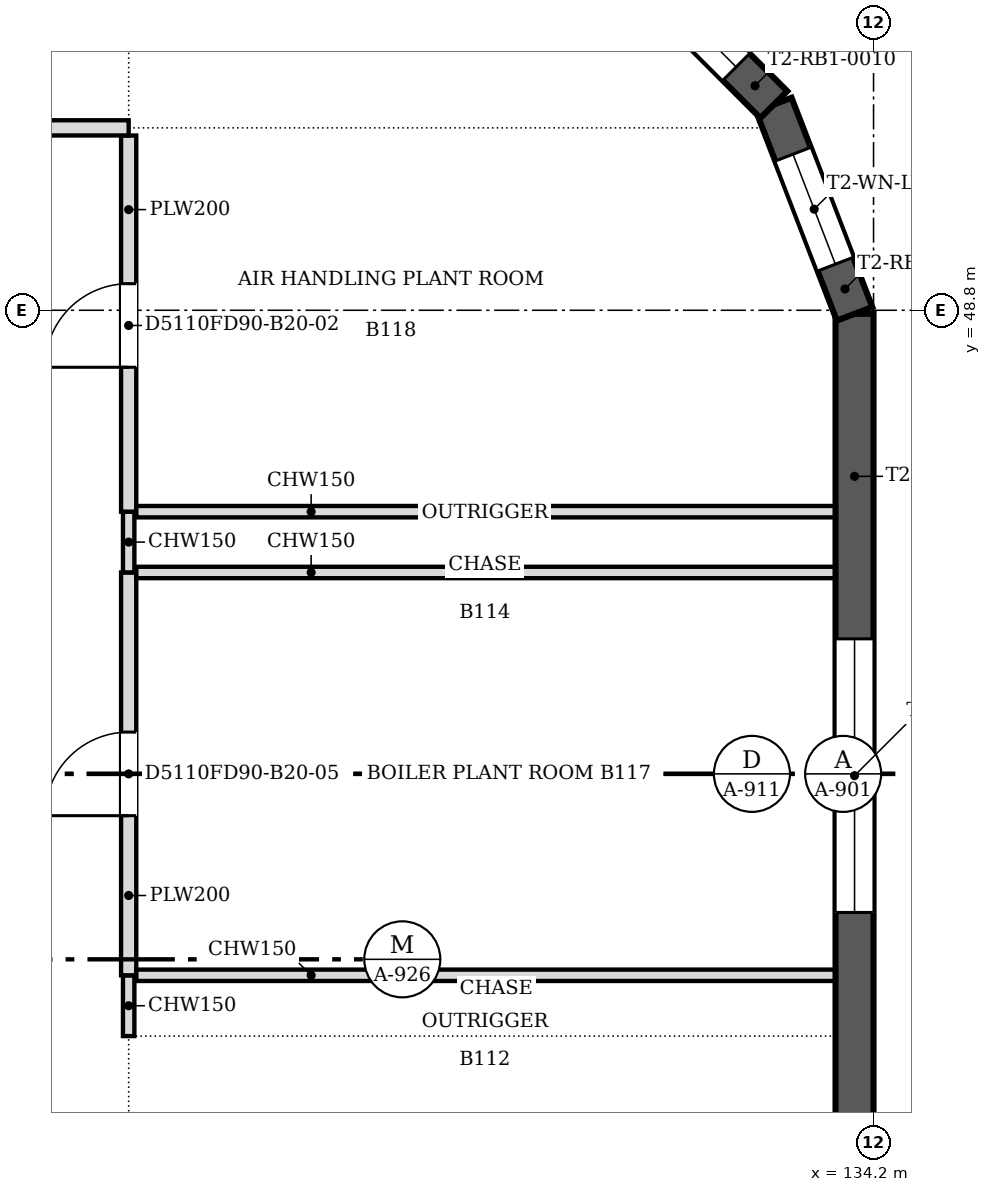
"""IFC4 building model, lengths in metres.
Left out: names, types, materials, properties, quantities, classifications, styles, units other than length and angle.
Written with IfcOpenShell. Run it as: python <this file> out.ifc"""

import sys

from ifc_helpers import new_model, si_unit, direction, frame, frame_2d, origin, place, context, subcontext, project, spatial, polyline, rectangle, outline, extrude, faceted_brep, source, transform, mapped, element, fill, save


model = new_model("IFC4")
c1 = context("Model", 3, precision=1e-05, world=origin(), true_north=direction((0.0, 1.0)))
c2 = subcontext(c1, "Body", "Model", "MODEL_VIEW")
j1 = project(units=[si_unit("LENGTHUNIT", "METRE"), si_unit("PLANEANGLEUNIT", "RADIAN")], contexts=[c1])
p1 = place(None, origin())
s1 = spatial("IfcSite", under=j1, at=p1, CompositionType="ELEMENT")
p2 = place(p1, origin())
s2 = spatial("IfcBuilding", under=s1, at=p2, CompositionType="ELEMENT")
p3 = place(p2, frame((0.0, 0.0, 63.8)))
s3 = spatial("IfcBuildingStorey", under=s2, at=p3, CompositionType="ELEMENT", Elevation=63.8)
m1 = source(origin(), c2, "Body", "Brep", [
    faceted_brep([(0.0, -0.25, 0.0), (12.154, -0.25, 0.0), (12.154, -0.25, 4.8), (0.0, -0.25, 4.8), (0.0, 0.25, 4.8), (12.107, 0.25, 4.8), (12.107, 0.25, 0.0), (0.0, 0.25, 0.0), (12.154, -0.0, 0.0), (12.154, -0.0, 4.8)], [[[0, 1, 2, 3]], [[4, 5, 6, 7]], [[7, 6, 8, 1, 0]], [[9, 2, 1, 8]], [[5, 4, 3, 2, 9]], [[4, 7, 0, 3]], [[8, 6, 5, 9]]]),
])
p4 = place(p3, frame((133.95, 36.6, 0.0), z_axis=(0.0, 0.0, 1.0), x_axis=(0.0, 1.0, 0.0)))
e1 = element("IfcWall", 1, at=p4, inside=s3, PredefinedType="SOLIDWALL", context=c2, shape_type="MappedRepresentation", body=[
    mapped(m1, transform((0.0, 0.0, 0.0), scale=1.0)),
])
m2 = source(origin(), c2, "Body", "SweptSolid", [
    extrude(outline(polyline([(4.277, 0.8), (7.877, 0.8), (7.877, 4.0), (4.277, 4.0), (4.277, 0.8)])), frame((0.0, 0.26, 0.0), z_axis=(0.0, -1.0, 0.0), x_axis=(1.0, 0.0, 0.0)), (0.0, 0.0, 1.0), 0.52),
])
p5 = place(p4, origin())
e2 = element("IfcOpeningElement", 2, at=p5, cuts=e1, PredefinedType="OPENING", context=c2, shape_type="MappedRepresentation", body=[
    mapped(m2, transform((0.0, 0.0, 0.0), scale=1.0)),
])
m3 = source(origin(), c2, "Body", "Brep", [
    faceted_brep([(0.0, -0.25, 0.0), (2.95, -0.25, 0.0), (2.95, -0.25, 4.8), (0.0, -0.25, 4.8), (0.047, 0.25, 4.8), (2.898, 0.25, 4.8), (2.898, 0.25, 0.0), (0.047, 0.25, 0.0), (2.95, 0.0, 0.0), (0.0, 0.0, 0.0), (2.95, 0.0, 4.8), (0.0, 0.0, 4.8)], [[[0, 1, 2, 3]], [[4, 5, 6, 7]], [[7, 6, 8, 1, 0, 9]], [[10, 2, 1, 8]], [[5, 4, 11, 3, 2, 10]], [[9, 0, 3, 11]], [[7, 9, 11, 4]], [[8, 6, 5, 10]]]),
])
p6 = place(p3, frame((133.95, 48.753, 0.0), z_axis=(0.0, 0.0, 1.0), x_axis=(-0.359877213415, 0.932999673775, 0.0)))
e3 = element("IfcWall", 3, at=p6, inside=s3, PredefinedType="SOLIDWALL", context=c2, shape_type="MappedRepresentation", body=[
    mapped(m3, transform((0.0, 0.0, 0.0), scale=1.0)),
])
m4 = source(origin(), c2, "Body", "SweptSolid", [
    extrude(outline(polyline([(0.7, 0.8), (2.25, 0.8), (2.25, 4.0), (0.7, 4.0), (0.7, 0.8)])), frame((0.0, 0.26, 0.0), z_axis=(0.0, -1.0, 0.0), x_axis=(1.0, 0.0, 0.0)), (0.0, 0.0, 1.0), 0.52),
])
p7 = place(p6, origin())
e4 = element("IfcOpeningElement", 4, at=p7, cuts=e3, PredefinedType="OPENING", context=c2, shape_type="MappedRepresentation", body=[
    mapped(m4, transform((0.0, 0.0, 0.0), scale=1.0)),
])
m5 = source(origin(), c2, "Body", "Brep", [
    faceted_brep([(0.0, -0.25, 0.0), (2.944, -0.25, 0.0), (2.944, -0.25, 4.8), (0.0, -0.25, 4.8), (0.053, 0.25, 4.8), (2.891, 0.25, 4.8), (2.891, 0.25, 0.0), (0.053, 0.25, 0.0), (2.944, 0.0, 0.0), (0.0, 0.0, 0.0), (2.944, 0.0, 4.8), (0.0, 0.0, 4.8)], [[[0, 1, 2, 3]], [[4, 5, 6, 7]], [[7, 6, 8, 1, 0, 9]], [[10, 2, 1, 8]], [[5, 4, 11, 3, 2, 10]], [[9, 0, 3, 11]], [[7, 9, 11, 4]], [[8, 6, 5, 10]]]),
])
p8 = place(p3, frame((132.888, 51.506, 0.0), z_axis=(0.0, 0.0, 1.0), x_axis=(-0.707106781187, 0.707106781187, 0.0)))
e5 = element("IfcWall", 5, at=p8, inside=s3, PredefinedType="SOLIDWALL", context=c2, shape_type="MappedRepresentation", body=[
    mapped(m5, transform((0.0, 0.0, 0.0), scale=1.0)),
])
m6 = source(origin(), c2, "Body", "SweptSolid", [
    extrude(outline(polyline([(0.7, 0.8), (2.244, 0.8), (2.244, 4.0), (0.7, 4.0), (0.7, 0.8)])), frame((0.0, 0.26, 0.0), z_axis=(0.0, -1.0, 0.0), x_axis=(1.0, 0.0, 0.0)), (0.0, 0.0, 1.0), 0.52),
])
p9 = place(p8, origin())
e6 = element("IfcOpeningElement", 6, at=p9, cuts=e5, PredefinedType="OPENING", context=c2, shape_type="MappedRepresentation", body=[
    mapped(m6, transform((0.0, 0.0, 0.0), scale=1.0)),
])
p10 = place(p3, frame((124.4, 39.25, 0.0), z_axis=(0.0, 0.0, 1.0), x_axis=(0.0, 1.0, 0.0)))
e7 = element("IfcWall", 7, at=p10, inside=s3, PredefinedType="PARTITIONING", context=c2, shape_type="SweptSolid", body=[
    extrude(rectangle(XDim=0.799, YDim=0.15, at=frame_2d((0.399, 0.0))), origin(), (0.0, 0.0, 1.0), 4.067),
])
p11 = place(p3, frame((124.4, 45.35, 0.0), z_axis=(0.0, 0.0, 1.0), x_axis=(0.0, -1.0, 0.0)))
e8 = element("IfcWall", 8, at=p11, inside=s3, PredefinedType="PARTITIONING", context=c2, shape_type="SweptSolid", body=[
    extrude(rectangle(XDim=5.3, YDim=0.2, at=frame_2d((2.65, 0.0))), origin(), (0.0, 0.0, 1.0), 4.067),
])
m7 = source(origin(), c2, "Body", "SweptSolid", [
    extrude(rectangle(XDim=1.1, YDim=2.1, at=frame_2d((0.55, 1.05))), frame((0.0, 0.11, 0.0), z_axis=(0.0, -1.0, 0.0), x_axis=(1.0, 0.0, 0.0)), (0.0, 0.0, 1.0), 0.22),
])
p12 = place(p11, frame((2.1, 0.0, 0.0)))
e9 = element("IfcOpeningElement", 9, at=p12, cuts=e8, PredefinedType="OPENING", context=c2, shape_type="MappedRepresentation", body=[
    mapped(m7, transform((0.0, 0.0, 0.0), scale=1.0)),
])
p13 = place(p3, frame((124.501, 40.05, 0.0), z_axis=(0.0, 0.0, 1.0), x_axis=(1.0, 0.0, 0.0)))
e10 = element("IfcWall", 10, at=p13, inside=s3, PredefinedType="PARTITIONING", context=c2, shape_type="SweptSolid", body=[
    extrude(rectangle(XDim=9.199, YDim=0.15, at=frame_2d((4.6, 0.0))), origin(), (0.0, 0.0, 1.0), 4.067),
])
p14 = place(p3, frame((124.4, 45.351, 0.0), z_axis=(0.0, 0.0, 1.0), x_axis=(0.0, 1.0, 0.0)))
e11 = element("IfcWall", 11, at=p14, inside=s3, PredefinedType="PARTITIONING", context=c2, shape_type="SweptSolid", body=[
    extrude(rectangle(XDim=0.798, YDim=0.15, at=frame_2d((0.399, 0.0))), origin(), (0.0, 0.0, 1.0), 4.067),
])
p15 = place(p3, frame((124.501, 45.35, 0.0), z_axis=(0.0, 0.0, 1.0), x_axis=(1.0, 0.0, 0.0)))
e12 = element("IfcWall", 12, at=p15, inside=s3, PredefinedType="PARTITIONING", context=c2, shape_type="SweptSolid", body=[
    extrude(rectangle(XDim=9.199, YDim=0.15, at=frame_2d((4.6, 0.0))), origin(), (0.0, 0.0, 1.0), 4.067),
])
p16 = place(p3, frame((124.4, 51.099, 0.0), z_axis=(0.0, 0.0, 1.0), x_axis=(0.0, -1.0, 0.0)))
e13 = element("IfcWall", 13, at=p16, inside=s3, PredefinedType="PARTITIONING", context=c2, shape_type="SweptSolid", body=[
    extrude(rectangle(XDim=4.949, YDim=0.2, at=frame_2d((2.475, 0.0))), origin(), (0.0, 0.0, 1.0), 4.067),
])
p17 = place(p16, frame((1.949, 0.0, 0.0)))
e14 = element("IfcOpeningElement", 14, at=p17, cuts=e13, PredefinedType="OPENING", context=c2, shape_type="MappedRepresentation", body=[
    mapped(m7, transform((0.0, 0.0, 0.0), scale=1.0)),
])
p18 = place(p3, frame((124.501, 46.15, 0.0), z_axis=(0.0, 0.0, 1.0), x_axis=(1.0, 0.0, 0.0)))
e15 = element("IfcWall", 15, at=p18, inside=s3, PredefinedType="PARTITIONING", context=c2, shape_type="SweptSolid", body=[
    extrude(rectangle(XDim=9.199, YDim=0.15, at=frame_2d((4.6, 0.0))), origin(), (0.0, 0.0, 1.0), 4.067),
])
p19 = place(p3, frame((112.2, 51.2, 0.0), z_axis=(0.0, 0.0, 1.0), x_axis=(1.0, 0.0, 0.0)))
e16 = element("IfcWall", 16, at=p19, inside=s3, PredefinedType="PARTITIONING", context=c2, shape_type="SweptSolid", body=[
    extrude(rectangle(XDim=12.2, YDim=0.2, at=frame_2d((6.1, 0.0))), origin(), (0.0, 0.0, 1.0), 4.067),
])
p20 = place(p19, frame((5.5, 0.0, 0.0)))
e17 = element("IfcOpeningElement", 17, at=p20, cuts=e16, PredefinedType="OPENING", context=c2, shape_type="MappedRepresentation", body=[
    mapped(m7, transform((0.0, 0.0, 0.0), scale=1.0)),
])
m8 = source(origin(), c2, "Body", "SweptSolid", [
    extrude(outline(polyline([(4.277, 0.8), (7.877, 0.8), (7.877, 4.0), (4.277, 4.0), (4.277, 0.8)])), frame((0.0, 0.03, 0.0), z_axis=(0.0, -1.0, 0.0), x_axis=(1.0, 0.0, 0.0)), (0.0, 0.0, 1.0), 0.06),
])
p21 = place(p5, origin())
e18 = element("IfcWindow", 18, at=p21, inside=s3, PartitioningType="USERDEFINED", PredefinedType="WINDOW", context=c2, shape_type="MappedRepresentation", body=[
    mapped(m8, transform((0.0, 0.0, 0.0), scale=1.0)),
])
fill(e2, e18)
m9 = source(origin(), c2, "Body", "SweptSolid", [
    extrude(outline(polyline([(0.7, 0.8), (2.25, 0.8), (2.25, 4.0), (0.7, 4.0), (0.7, 0.8)])), frame((0.0, 0.03, 0.0), z_axis=(0.0, -1.0, 0.0), x_axis=(1.0, 0.0, 0.0)), (0.0, 0.0, 1.0), 0.06),
])
p22 = place(p7, origin())
e19 = element("IfcWindow", 19, at=p22, inside=s3, PartitioningType="USERDEFINED", PredefinedType="WINDOW", context=c2, shape_type="MappedRepresentation", body=[
    mapped(m9, transform((0.0, 0.0, 0.0), scale=1.0)),
])
fill(e4, e19)
m10 = source(origin(), c2, "Body", "SweptSolid", [
    extrude(outline(polyline([(0.7, 0.8), (2.244, 0.8), (2.244, 4.0), (0.7, 4.0), (0.7, 0.8)])), frame((0.0, 0.03, 0.0), z_axis=(0.0, -1.0, 0.0), x_axis=(1.0, 0.0, 0.0)), (0.0, 0.0, 1.0), 0.06),
])
p23 = place(p9, origin())
e20 = element("IfcWindow", 20, at=p23, inside=s3, PartitioningType="USERDEFINED", PredefinedType="WINDOW", context=c2, shape_type="MappedRepresentation", body=[
    mapped(m10, transform((0.0, 0.0, 0.0), scale=1.0)),
])
fill(e6, e20)
m11 = source(origin(), c2, "Body", "SweptSolid", [
    extrude(rectangle(XDim=1.1, YDim=2.1, at=frame_2d((0.55, 1.05))), frame((0.0, 0.025, 0.0), z_axis=(0.0, -1.0, 0.0), x_axis=(1.0, 0.0, 0.0)), (0.0, 0.0, 1.0), 0.05),
])
p24 = place(p17, origin())
e21 = element("IfcDoor", 21, at=p24, inside=s3, OperationType="SINGLE_SWING_RIGHT", PredefinedType="DOOR", context=c2, shape_type="MappedRepresentation", body=[
    mapped(m11, transform((0.0, 0.0, 0.0), scale=1.0)),
])
fill(e14, e21)
p25 = place(p12, origin())
e22 = element("IfcDoor", 22, at=p25, inside=s3, OperationType="SINGLE_SWING_RIGHT", PredefinedType="DOOR", context=c2, shape_type="MappedRepresentation", body=[
    mapped(m11, transform((0.0, 0.0, 0.0), scale=1.0)),
])
fill(e9, e22)
save(model, sys.argv[1])
